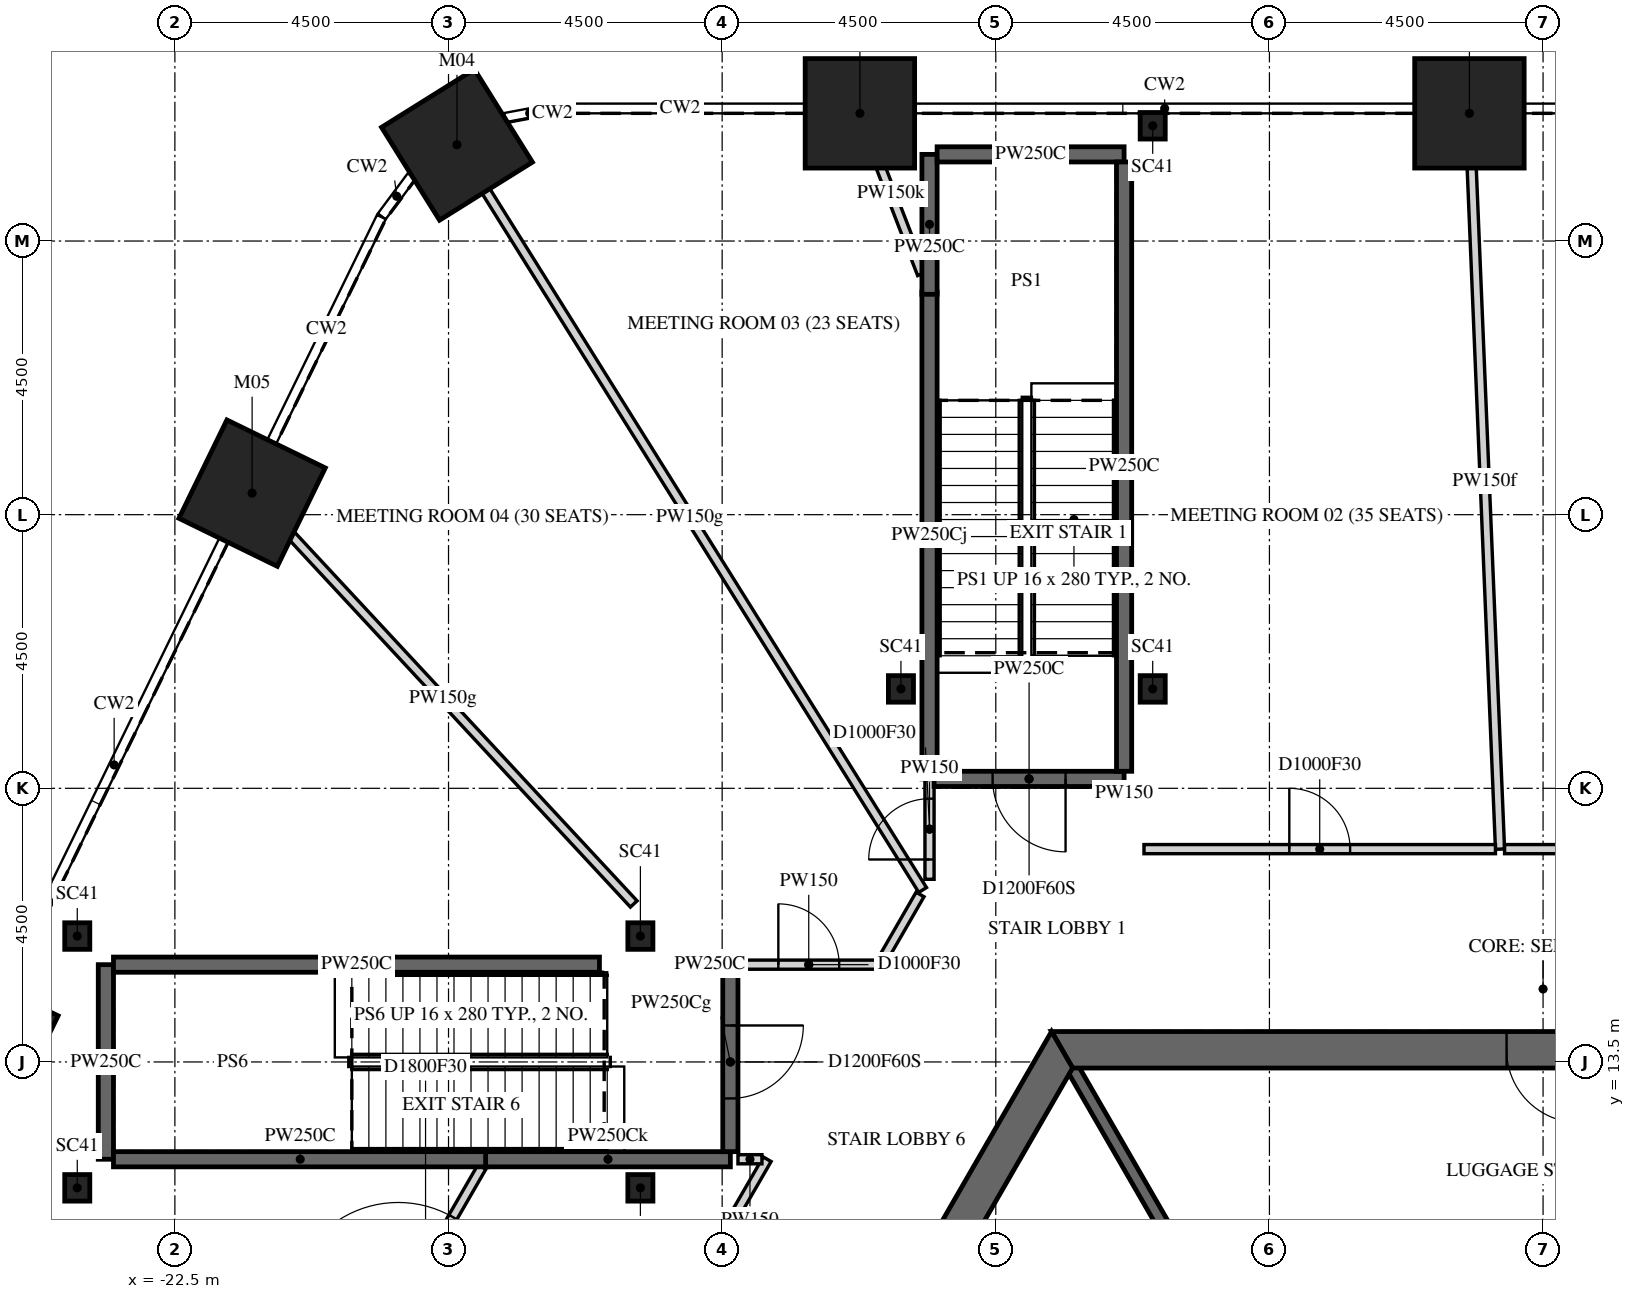
"""IFC4 building model, lengths in metres.
Left out: names, types, materials, properties, quantities, classifications, styles, units other than length and angle.
Written with IfcOpenShell. Run it as: python <this file> out.ifc"""

import sys

from ifc_helpers import new_model, si_unit, direction, frame, frame_2d, origin, origin_2d, place, context, subcontext, project, spatial, polyline, rectangle, i_section, outline, extrude, element, fill, save


model = new_model("IFC4")
c1 = context("Model", 3, precision=1e-05, world=origin(), true_north=direction((0.0, 1.0)))
c2 = subcontext(c1, "Body", "Model", "MODEL_VIEW")
j1 = project(units=[si_unit("LENGTHUNIT", "METRE"), si_unit("PLANEANGLEUNIT", "RADIAN")], contexts=[c1])
p1 = place(None, origin())
s1 = spatial("IfcSite", under=j1, at=p1, CompositionType="ELEMENT")
p2 = place(p1, origin())
s2 = spatial("IfcBuilding", under=s1, at=p2, CompositionType="ELEMENT")
p3 = place(p2, frame((0.0, 0.0, 15.0)))
s3 = spatial("IfcBuildingStorey", under=s2, at=p3, CompositionType="ELEMENT", Elevation=15.0)
for number, where, z_axis, x_axis in (
    (1, (-1.211, 29.1, -0.25), (0.0, 0.0, 1.0), (1.0, 0.0, 0.0)),
    (2, (-11.235, 29.1, -0.25), (0.0, 0.0, 1.0), (1.0, 0.0, 0.0)),
    (3, (-17.861, 28.583, -0.25), (0.0, 0.0, 1.0), (0.848, 0.53, 0.0)),
    (4, (-21.23, 22.854, -0.25), (0.0, 0.0, 1.0), (0.438, 0.899, 0.0)),
    (5, (-25.624, 13.845, -0.25), (0.0, 0.0, 1.0), (0.438, 0.899, 0.0)),
):
    element("IfcColumn", number, at=place(p3, frame(where, z_axis=z_axis, x_axis=x_axis)), inside=s3, PredefinedType="COLUMN", context=c2, shape_type="SweptSolid", body=[
        extrude(rectangle(XDim=1.8, YDim=1.8, at=origin_2d()), origin(), (0.0, 0.0, 1.0), 5.5),
    ])
for number, where, z_axis, x_axis in (
    (6, (-6.419, 28.895, -0.25), (0.0, 0.0, 1.0), (1.0, 0.0, 0.0)),
    (7, (-6.419, 19.635, -0.25), (0.0, 0.0, 1.0), (1.0, 0.0, 0.0)),
    (8, (-10.56, 19.635, -0.25), (0.0, 0.0, 1.0), (1.0, 0.0, 0.0)),
    (9, (-24.105, 11.43, -0.25), (0.0, 0.0, 1.0), (1.0, 0.0, 0.0)),
    (10, (-24.105, 15.57, -0.25), (0.0, 0.0, 1.0), (1.0, 0.0, 0.0)),
    (11, (-14.845, 15.57, -0.25), (0.0, 0.0, 1.0), (1.0, 0.0, 0.0)),
    (12, (-14.845, 11.43, -0.25), (0.0, 0.0, 1.0), (1.0, 0.0, 0.0)),
):
    element("IfcColumn", number, at=place(p3, frame(where, z_axis=z_axis, x_axis=x_axis)), inside=s3, PredefinedType="COLUMN", context=c2, shape_type="SweptSolid", body=[
        extrude(i_section(OverallWidth=0.412, OverallDepth=0.437, WebThickness=0.036, FlangeThickness=0.058, FilletRadius=0.015, at=origin_2d()), origin(), (0.0, 0.0, 1.0), 5.5),
    ])
p4 = place(p3, frame((-7.91, 13.7, -0.25), z_axis=(0.0, 0.0, 1.0), x_axis=(-0.499999880136, -0.866025472988, 0.0)))
e13 = element("IfcWall", 13, at=p4, inside=s3, PredefinedType="SHEAR", context=c2, shape_type="SweptSolid", body=[
    extrude(outline(polyline([(-0.173, -0.3), (15.993, -0.3), (15.646, 0.3), (0.173, 0.3), (-0.173, -0.3)])), origin(), (0.0, 0.0, 1.0), 5.5),
])
p5 = place(p4, frame((7.039, 0.0, 0.25)))
e14 = element("IfcOpeningElement", 14, at=p5, cuts=e13, PredefinedType="OPENING", context=c2, shape_type="SweptSolid", body=[
    extrude(rectangle(XDim=1.8, YDim=2.4, at=frame_2d((0.9, 1.2))), frame((0.0, 0.31, 0.0), z_axis=(0.0, -1.0, 0.0), x_axis=(1.0, 0.0, 0.0)), (0.0, 0.0, 1.0), 0.62),
])
p6 = place(p3, frame((7.91, 13.7, -0.25), z_axis=(0.0, 0.0, 1.0), x_axis=(-1.0, 0.0, 0.0)))
e15 = element("IfcWall", 15, at=p6, inside=s3, PredefinedType="SHEAR", context=c2, shape_type="SweptSolid", body=[
    extrude(outline(polyline([(-0.173, -0.3), (15.993, -0.3), (15.646, 0.3), (0.173, 0.3), (-0.173, -0.3)])), origin(), (0.0, 0.0, 1.0), 5.5),
])
p7 = place(p6, frame((7.31, 0.0, 0.25)))
e16 = element("IfcOpeningElement", 16, at=p7, cuts=e15, PredefinedType="OPENING", context=c2, shape_type="SweptSolid", body=[
    extrude(rectangle(XDim=1.2, YDim=2.4, at=frame_2d((0.6, 1.2))), frame((0.0, 0.31, 0.0), z_axis=(0.0, -1.0, 0.0), x_axis=(1.0, 0.0, 0.0)), (0.0, 0.0, 1.0), 0.62),
])
p8 = place(p3, frame((-5.773, 10.0, -0.25), z_axis=(0.0, 0.0, 1.0), x_axis=(-0.500038251005, 0.86600331843, 0.0)))
e17 = element("IfcWall", 17, at=p8, inside=s3, PredefinedType="SHEAR", context=c2, shape_type="SweptSolid", body=[
    extrude(rectangle(XDim=3.926, YDim=0.2, at=frame_2d((1.963, 0.0))), origin(), (0.0, 0.0, 1.0), 5.5),
])
p9 = place(p3, frame((-23.635, 11.9, 0.0), z_axis=(0.0, 0.0, 1.0), x_axis=(0.0, 1.0, 0.0)))
e18 = element("IfcWall", 18, at=p9, inside=s3, PredefinedType="PARTITIONING", context=c2, shape_type="SweptSolid", body=[
    extrude(rectangle(XDim=3.2, YDim=0.25, at=frame_2d((1.6, 0.0))), origin(), (0.0, 0.0, 1.0), 5.25),
])
p10 = place(p3, frame((-23.51, 15.1, 0.0), z_axis=(0.0, 0.0, 1.0), x_axis=(1.0, 0.0, 0.0)))
e19 = element("IfcWall", 19, at=p10, inside=s3, PredefinedType="PARTITIONING", context=c2, shape_type="SweptSolid", body=[
    extrude(rectangle(XDim=7.992, YDim=0.25, at=frame_2d((3.996, 0.0))), origin(), (0.0, 0.0, 1.0), 5.25),
])
p11 = place(p3, frame((-21.23, 22.854, 0.0), z_axis=(0.0, 0.0, 1.0), x_axis=(0.680588181583, -0.732666177116, 0.0)))
e20 = element("IfcWall", 20, at=p11, inside=s3, PredefinedType="PARTITIONING", context=c2, shape_type="SweptSolid", body=[
    extrude(rectangle(XDim=9.221, YDim=0.15, at=frame_2d((4.611, 0.0))), origin(), (0.0, 0.0, 1.0), 4.488),
])
p12 = place(p3, frame((-17.861, 28.584, 0.0), z_axis=(0.0, 0.0, 1.0), x_axis=(0.529906308886, -0.848056191418, 0.0)))
e21 = element("IfcWall", 21, at=p12, inside=s3, PredefinedType="PARTITIONING", context=c2, shape_type="SweptSolid", body=[
    extrude(rectangle(XDim=14.452, YDim=0.15, at=frame_2d((7.226, 0.0))), origin(), (0.0, 0.0, 1.0), 4.488),
])
p13 = place(p3, frame((-23.268, 1.7, 0.0), z_axis=(0.0, 0.0, 1.0), x_axis=(0.500054871588, 0.86599372134, 0.0)))
e22 = element("IfcWall", 22, at=p13, inside=s3, PredefinedType="PARTITIONING", context=c2, shape_type="SweptSolid", body=[
    extrude(rectangle(XDim=11.634, YDim=0.15, at=frame_2d((5.817, 0.0))), origin(), (0.0, 0.0, 1.0), 5.25),
])
p14 = place(p13, frame((8.879, 0.0, 0.0)))
e23 = element("IfcOpeningElement", 23, at=p14, cuts=e22, PredefinedType="OPENING", context=c2, shape_type="SweptSolid", body=[
    extrude(rectangle(XDim=1.8, YDim=2.1, at=frame_2d((0.9, 1.05))), frame((0.0, 0.085, 0.0), z_axis=(0.0, -1.0, 0.0), x_axis=(1.0, 0.0, 0.0)), (0.0, 0.0, 1.0), 0.17),
])
p15 = place(p13, frame((6.804, 0.0, 0.0)))
e24 = element("IfcOpeningElement", 24, at=p15, cuts=e22, PredefinedType="OPENING", context=c2, shape_type="SweptSolid", body=[
    extrude(rectangle(XDim=1.8, YDim=2.1, at=frame_2d((0.9, 1.05))), frame((0.0, 0.085, 0.0), z_axis=(0.0, -1.0, 0.0), x_axis=(1.0, 0.0, 0.0)), (0.0, 0.0, 1.0), 0.17),
])
p16 = place(p13, frame((4.854, 0.0, 0.0)))
e25 = element("IfcOpeningElement", 25, at=p16, cuts=e22, PredefinedType="OPENING", context=c2, shape_type="SweptSolid", body=[
    extrude(rectangle(XDim=1.8, YDim=2.1, at=frame_2d((0.9, 1.05))), frame((0.0, 0.085, 0.0), z_axis=(0.0, -1.0, 0.0), x_axis=(1.0, 0.0, 0.0)), (0.0, 0.0, 1.0), 0.17),
])
p17 = place(p13, frame((2.904, 0.0, 0.0)))
e26 = element("IfcOpeningElement", 26, at=p17, cuts=e22, PredefinedType="OPENING", context=c2, shape_type="SweptSolid", body=[
    extrude(rectangle(XDim=1.8, YDim=2.1, at=frame_2d((0.9, 1.05))), frame((0.0, 0.085, 0.0), z_axis=(0.0, -1.0, 0.0), x_axis=(1.0, 0.0, 0.0)), (0.0, 0.0, 1.0), 0.17),
])
p18 = place(p13, frame((0.955, 0.0, 0.0)))
e27 = element("IfcOpeningElement", 27, at=p18, cuts=e22, PredefinedType="OPENING", context=c2, shape_type="SweptSolid", body=[
    extrude(rectangle(XDim=1.8, YDim=2.1, at=frame_2d((0.9, 1.05))), frame((0.0, 0.085, 0.0), z_axis=(0.0, -1.0, 0.0), x_axis=(1.0, 0.0, 0.0)), (0.0, 0.0, 1.0), 0.17),
])
p19 = place(p3, frame((-17.368, 11.9, 0.0), z_axis=(0.0, 0.0, 1.0), x_axis=(-1.0, 0.0, 0.0)))
e28 = element("IfcWall", 28, at=p19, inside=s3, PredefinedType="PARTITIONING", context=c2, shape_type="SweptSolid", body=[
    extrude(rectangle(XDim=6.142, YDim=0.25, at=frame_2d((3.071, 0.0))), origin(), (0.0, 0.0, 1.0), 5.25),
])
p20 = place(p3, frame((-14.04, 15.1, 0.0), z_axis=(0.0, 0.0, 1.0), x_axis=(1.0, 0.0, 0.0)))
e29 = element("IfcWall", 29, at=p20, inside=s3, PredefinedType="PARTITIONING", context=c2, shape_type="SweptSolid", body=[
    extrude(rectangle(XDim=0.675, YDim=0.25, at=frame_2d((0.337, 0.0))), origin(), (0.0, 0.0, 1.0), 5.25),
])
p21 = place(p3, frame((-13.365, 11.9, 0.0), z_axis=(0.0, 0.0, 1.0), x_axis=(-1.0, 0.0, 0.0)))
e30 = element("IfcWall", 30, at=p21, inside=s3, PredefinedType="PARTITIONING", context=c2, shape_type="SweptSolid", body=[
    extrude(rectangle(XDim=4.025, YDim=0.25, at=frame_2d((2.012, 0.0))), origin(), (0.0, 0.0, 1.0), 4.797),
])
p22 = place(p3, frame((-13.365, 14.975, 0.0), z_axis=(0.0, 0.0, 1.0), x_axis=(0.0, -1.0, 0.0)))
e31 = element("IfcWall", 31, at=p22, inside=s3, PredefinedType="PARTITIONING", context=c2, shape_type="SweptSolid", body=[
    extrude(rectangle(XDim=2.95, YDim=0.25, at=frame_2d((1.475, 0.0))), origin(), (0.0, 0.0, 1.0), 4.488),
])
p23 = place(p22, frame((0.875, 0.0, 0.0)))
e32 = element("IfcOpeningElement", 32, at=p23, cuts=e31, PredefinedType="OPENING", context=c2, shape_type="SweptSolid", body=[
    extrude(rectangle(XDim=1.2, YDim=2.1, at=frame_2d((0.6, 1.05))), frame((0.0, 0.135, 0.0), z_axis=(0.0, -1.0, 0.0), x_axis=(1.0, 0.0, 0.0)), (0.0, 0.0, 1.0), 0.27),
])
p24 = place(p3, frame((-13.24, 15.1, 0.0), z_axis=(0.0, 0.0, 1.0), x_axis=(1.0, 0.0, 0.0)))
e33 = element("IfcWall", 33, at=p24, inside=s3, PredefinedType="PARTITIONING", context=c2, shape_type="SweptSolid", body=[
    extrude(rectangle(XDim=2.328, YDim=0.15, at=frame_2d((1.164, 0.0))), origin(), (0.0, 0.0, 1.0), 5.25),
])
p25 = place(p24, frame((0.664, 0.0, 0.0)))
e34 = element("IfcOpeningElement", 34, at=p25, cuts=e33, PredefinedType="OPENING", context=c2, shape_type="SweptSolid", body=[
    extrude(rectangle(XDim=1.0, YDim=2.1, at=frame_2d((0.5, 1.05))), frame((0.0, 0.085, 0.0), z_axis=(0.0, -1.0, 0.0), x_axis=(1.0, 0.0, 0.0)), (0.0, 0.0, 1.0), 0.17),
])
p26 = place(p3, frame((-12.76, 11.9, 0.0), z_axis=(0.0, 0.0, 1.0), x_axis=(-0.50009934258, -0.865968040721, 0.0)))
e35 = element("IfcWall", 35, at=p26, inside=s3, PredefinedType="PARTITIONING", context=c2, shape_type="SweptSolid", body=[
    extrude(rectangle(XDim=3.925, YDim=0.15, at=frame_2d((1.962, 0.0))), origin(), (0.0, 0.0, 1.0), 5.25),
])
p27 = place(p3, frame((-12.846, 11.9, 0.0), z_axis=(0.0, 0.0, 1.0), x_axis=(-1.0, 0.0, 0.0)))
e36 = element("IfcWall", 36, at=p27, inside=s3, PredefinedType="PARTITIONING", context=c2, shape_type="SweptSolid", body=[
    extrude(rectangle(XDim=0.394, YDim=0.15, at=frame_2d((0.197, 0.0))), origin(), (0.0, 0.0, 1.0), 5.25),
])
p28 = place(p3, frame((-11.235, 29.1, 0.0), z_axis=(0.0, 0.0, 1.0), x_axis=(0.360128239505, -0.932902809038, 0.0)))
e37 = element("IfcWall", 37, at=p28, inside=s3, PredefinedType="PARTITIONING", context=c2, shape_type="SweptSolid", body=[
    extrude(rectangle(XDim=2.832, YDim=0.15, at=frame_2d((1.416, 0.0))), origin(), (0.0, 0.0, 1.0), 4.323),
])
p29 = place(p3, frame((-10.245, 16.254, 0.0), z_axis=(0.0, 0.0, 1.0), x_axis=(-0.50007851496, -0.865980068405, 0.0)))
e38 = element("IfcWall", 38, at=p29, inside=s3, PredefinedType="PARTITIONING", context=c2, shape_type="SweptSolid", body=[
    extrude(rectangle(XDim=1.246, YDim=0.15, at=frame_2d((0.623, 0.0))), origin(), (0.0, 0.0, 1.0), 5.25),
])
p30 = place(p3, frame((-10.09, 16.504, 0.0), z_axis=(0.0, 0.0, 1.0), x_axis=(0.0, 1.0, 0.0)))
e39 = element("IfcWall", 39, at=p30, inside=s3, PredefinedType="PARTITIONING", context=c2, shape_type="SweptSolid", body=[
    extrude(rectangle(XDim=1.651, YDim=0.15, at=frame_2d((0.826, 0.0))), origin(), (0.0, 0.0, 1.0), 5.25),
])
p31 = place(p30, frame((0.325, 0.0, 0.0)))
e40 = element("IfcOpeningElement", 40, at=p31, cuts=e39, PredefinedType="OPENING", context=c2, shape_type="SweptSolid", body=[
    extrude(rectangle(XDim=1.0, YDim=2.1, at=frame_2d((0.5, 1.05))), frame((0.0, 0.085, 0.0), z_axis=(0.0, -1.0, 0.0), x_axis=(1.0, 0.0, 0.0)), (0.0, 0.0, 1.0), 0.17),
])
p32 = place(p3, frame((-10.09, 18.155, 0.0), z_axis=(0.0, 0.0, 1.0), x_axis=(0.0, 1.0, 0.0)))
e41 = element("IfcWall", 41, at=p32, inside=s3, PredefinedType="PARTITIONING", context=c2, shape_type="SweptSolid", body=[
    extrude(rectangle(XDim=8.006, YDim=0.25, at=frame_2d((4.003, 0.0))), origin(), (0.0, 0.0, 1.0), 4.717),
])
p33 = place(p3, frame((-6.89, 18.155, 0.0), z_axis=(0.0, 0.0, 1.0), x_axis=(-1.0, 0.0, 0.0)))
e42 = element("IfcWall", 42, at=p33, inside=s3, PredefinedType="PARTITIONING", context=c2, shape_type="SweptSolid", body=[
    extrude(rectangle(XDim=3.125, YDim=0.25, at=frame_2d((1.562, 0.0))), origin(), (0.0, 0.0, 1.0), 5.25),
])
p34 = place(p33, frame((0.962, 0.0, 0.0)))
e43 = element("IfcOpeningElement", 43, at=p34, cuts=e42, PredefinedType="OPENING", context=c2, shape_type="SweptSolid", body=[
    extrude(rectangle(XDim=1.2, YDim=2.1, at=frame_2d((0.6, 1.05))), frame((0.0, 0.135, 0.0), z_axis=(0.0, -1.0, 0.0), x_axis=(1.0, 0.0, 0.0)), (0.0, 0.0, 1.0), 0.27),
])
p35 = place(p3, frame((-10.09, 26.124, 0.0), z_axis=(0.0, 0.0, 1.0), x_axis=(0.0, 1.0, 0.0)))
e44 = element("IfcWall", 44, at=p35, inside=s3, PredefinedType="PARTITIONING", context=c2, shape_type="SweptSolid", body=[
    extrude(rectangle(XDim=2.301, YDim=0.25, at=frame_2d((1.15, 0.0))), origin(), (0.0, 0.0, 1.0), 5.25),
])
p36 = place(p3, frame((-9.965, 28.425, 0.0), z_axis=(0.0, 0.0, 1.0), x_axis=(1.0, 0.0, 0.0)))
e45 = element("IfcWall", 45, at=p36, inside=s3, PredefinedType="PARTITIONING", context=c2, shape_type="SweptSolid", body=[
    extrude(rectangle(XDim=3.075, YDim=0.25, at=frame_2d((1.538, 0.0))), origin(), (0.0, 0.0, 1.0), 5.25),
])
p37 = place(p3, frame((-6.89, 18.03, 0.0), z_axis=(0.0, 0.0, 1.0), x_axis=(0.0, -1.0, 0.0)))
e46 = element("IfcWall", 46, at=p37, inside=s3, PredefinedType="PARTITIONING", context=c2, shape_type="SweptSolid", body=[
    extrude(rectangle(XDim=0.211, YDim=0.15, at=frame_2d((0.105, 0.0))), origin(), (0.0, 0.0, 1.0), 5.25),
])
p38 = place(p3, frame((-6.89, 28.3, 0.0), z_axis=(0.0, 0.0, 1.0), x_axis=(0.0, -1.0, 0.0)))
e47 = element("IfcWall", 47, at=p38, inside=s3, PredefinedType="PARTITIONING", context=c2, shape_type="SweptSolid", body=[
    extrude(rectangle(XDim=10.02, YDim=0.25, at=frame_2d((5.01, 0.0))), origin(), (0.0, 0.0, 1.0), 5.25),
])
p39 = place(p3, frame((-1.211, 29.1, 0.0), z_axis=(0.0, 0.0, 1.0), x_axis=(0.041528245439, -0.999137330316, 0.0)))
e48 = element("IfcWall", 48, at=p39, inside=s3, PredefinedType="PARTITIONING", context=c2, shape_type="SweptSolid", body=[
    extrude(rectangle(XDim=12.111, YDim=0.15, at=frame_2d((6.055, 0.0))), origin(), (0.0, 0.0, 1.0), 4.496),
])
p40 = place(p3, frame((-6.563, 17.0, 0.0), z_axis=(0.0, 0.0, 1.0), x_axis=(1.0, 0.0, 0.0)))
e49 = element("IfcWall", 49, at=p40, inside=s3, PredefinedType="PARTITIONING", context=c2, shape_type="SweptSolid", body=[
    extrude(rectangle(XDim=5.78, YDim=0.15, at=frame_2d((2.89, 0.0))), origin(), (0.0, 0.0, 1.0), 5.25),
])
p41 = place(p40, frame((2.39, 0.0, 0.0)))
e50 = element("IfcOpeningElement", 50, at=p41, cuts=e49, PredefinedType="OPENING", context=c2, shape_type="SweptSolid", body=[
    extrude(rectangle(XDim=1.0, YDim=2.1, at=frame_2d((0.5, 1.05))), frame((0.0, 0.085, 0.0), z_axis=(0.0, -1.0, 0.0), x_axis=(1.0, 0.0, 0.0)), (0.0, 0.0, 1.0), 0.17),
])
p42 = place(p3, frame((-0.633, 17.0, 0.0), z_axis=(0.0, 0.0, 1.0), x_axis=(1.0, 0.0, 0.0)))
e51 = element("IfcWall", 51, at=p42, inside=s3, PredefinedType="PARTITIONING", context=c2, shape_type="SweptSolid", body=[
    extrude(rectangle(XDim=5.781, YDim=0.15, at=frame_2d((2.891, 0.0))), origin(), (0.0, 0.0, 1.0), 5.25),
])
p43 = place(p42, frame((2.39, 0.0, 0.0)))
e52 = element("IfcOpeningElement", 52, at=p43, cuts=e51, PredefinedType="OPENING", context=c2, shape_type="SweptSolid", body=[
    extrude(rectangle(XDim=1.0, YDim=2.1, at=frame_2d((0.5, 1.05))), frame((0.0, 0.085, 0.0), z_axis=(0.0, -1.0, 0.0), x_axis=(1.0, 0.0, 0.0)), (0.0, 0.0, 1.0), 0.17),
])
p44 = place(p7, origin())
e53 = element("IfcDoor", 53, at=p44, inside=s3, OperationType="SINGLE_SWING_LEFT", PredefinedType="DOOR", context=c2, shape_type="SweptSolid", body=[
    extrude(rectangle(XDim=1.2, YDim=2.4, at=frame_2d((0.6, 1.2))), frame((0.0, 0.025, 0.0), z_axis=(0.0, -1.0, 0.0), x_axis=(1.0, 0.0, 0.0)), (0.0, 0.0, 1.0), 0.05),
])
fill(e16, e53)
p45 = place(p14, origin())
e54 = element("IfcDoor", 54, at=p45, inside=s3, OperationType="DOUBLE_DOOR_SINGLE_SWING", PredefinedType="DOOR", context=c2, shape_type="SweptSolid", body=[
    extrude(rectangle(XDim=1.8, YDim=2.1, at=frame_2d((0.9, 1.05))), frame((0.0, 0.025, 0.0), z_axis=(0.0, -1.0, 0.0), x_axis=(1.0, 0.0, 0.0)), (0.0, 0.0, 1.0), 0.05),
])
fill(e23, e54)
p46 = place(p23, origin())
e55 = element("IfcDoor", 55, at=p46, inside=s3, OperationType="SINGLE_SWING_LEFT", PredefinedType="DOOR", context=c2, shape_type="SweptSolid", body=[
    extrude(rectangle(XDim=1.2, YDim=2.1, at=frame_2d((0.6, 1.05))), frame((0.0, 0.025, 0.0), z_axis=(0.0, -1.0, 0.0), x_axis=(1.0, 0.0, 0.0)), (0.0, 0.0, 1.0), 0.05),
])
fill(e32, e55)
p47 = place(p25, origin())
e56 = element("IfcDoor", 56, at=p47, inside=s3, OperationType="SINGLE_SWING_RIGHT", PredefinedType="DOOR", context=c2, shape_type="SweptSolid", body=[
    extrude(rectangle(XDim=1.0, YDim=2.1, at=frame_2d((0.5, 1.05))), frame((0.0, 0.025, 0.0), z_axis=(0.0, -1.0, 0.0), x_axis=(1.0, 0.0, 0.0)), (0.0, 0.0, 1.0), 0.05),
])
fill(e34, e56)
p48 = place(p31, origin())
e57 = element("IfcDoor", 57, at=p48, inside=s3, OperationType="SINGLE_SWING_RIGHT", PredefinedType="DOOR", context=c2, shape_type="SweptSolid", body=[
    extrude(rectangle(XDim=1.0, YDim=2.1, at=frame_2d((0.5, 1.05))), frame((0.0, 0.025, 0.0), z_axis=(0.0, -1.0, 0.0), x_axis=(1.0, 0.0, 0.0)), (0.0, 0.0, 1.0), 0.05),
])
fill(e40, e57)
p49 = place(p34, origin())
e58 = element("IfcDoor", 58, at=p49, inside=s3, OperationType="SINGLE_SWING_LEFT", PredefinedType="DOOR", context=c2, shape_type="SweptSolid", body=[
    extrude(rectangle(XDim=1.2, YDim=2.1, at=frame_2d((0.6, 1.05))), frame((0.0, 0.025, 0.0), z_axis=(0.0, -1.0, 0.0), x_axis=(1.0, 0.0, 0.0)), (0.0, 0.0, 1.0), 0.05),
])
fill(e43, e58)
p50 = place(p41, origin())
e59 = element("IfcDoor", 59, at=p50, inside=s3, OperationType="SINGLE_SWING_RIGHT", PredefinedType="DOOR", context=c2, shape_type="SweptSolid", body=[
    extrude(rectangle(XDim=1.0, YDim=2.1, at=frame_2d((0.5, 1.05))), frame((0.0, 0.025, 0.0), z_axis=(0.0, -1.0, 0.0), x_axis=(1.0, 0.0, 0.0)), (0.0, 0.0, 1.0), 0.05),
])
fill(e50, e59)
save(model, sys.argv[1])
